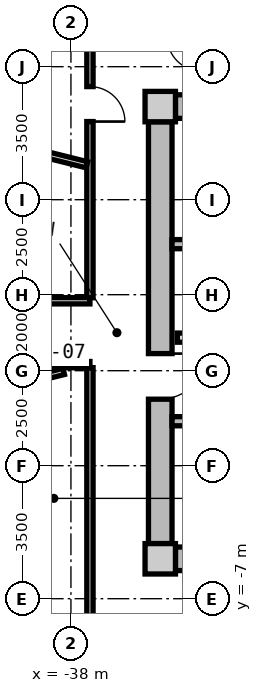
"""IFC4 building model, lengths in metres.
Left out: names, types, materials, properties, quantities, classifications, styles, units other than length and angle.
Written with IfcOpenShell. Run it as: python <this file> out.ifc"""

import sys

from ifc_helpers import new_model, si_unit, direction, frame, frame_2d, origin, origin_2d, place, context, subcontext, project, spatial, rectangle, extrude, source, transform, mapped, element, fill, save


model = new_model("IFC4")
c1 = context("Model", 3, precision=1e-05, world=origin(), true_north=direction((0.0, 1.0)))
c2 = subcontext(c1, "Body", "Model", "MODEL_VIEW")
j1 = project(units=[si_unit("LENGTHUNIT", "METRE"), si_unit("PLANEANGLEUNIT", "RADIAN")], contexts=[c1])
p1 = place(None, origin())
s1 = spatial("IfcSite", under=j1, at=p1, CompositionType="ELEMENT")
p2 = place(p1, origin())
s2 = spatial("IfcBuilding", under=s1, at=p2, CompositionType="ELEMENT")
p3 = place(p2, frame((0.0, 0.0, 161.75)))
s3 = spatial("IfcBuildingStorey", under=s2, at=p3, CompositionType="ELEMENT", Elevation=161.75)
m1 = source(origin(), c2, "Body", "SweptSolid", [
    extrude(rectangle(XDim=0.8, YDim=0.8, at=origin_2d()), origin(), (0.0, 0.0, 1.0), 3.05),
])
for number, where, z_axis, x_axis in (
    (1, (-35.65, -5.95, 0.0), (0.0, 0.0, 1.0), (1.0, 0.0, 0.0)),
    (2, (-35.65, 5.95, 0.0), (0.0, 0.0, 1.0), (1.0, 0.0, 0.0)),
):
    element("IfcColumn", number, at=place(p3, frame(where, z_axis=z_axis, x_axis=x_axis)), inside=s3, PredefinedType="COLUMN", context=c2, shape_type="MappedRepresentation", body=[
        mapped(m1, transform((0.0, 0.0, 0.0), x_axis=(1.0, 0.0, 0.0), y_axis=(0.0, 1.0, 0.0), z_axis=(0.0, 0.0, 1.0), scale=1.0)),
    ])
m2 = source(origin(), c2, "Body", "SweptSolid", [
    extrude(rectangle(XDim=14.5, YDim=0.62, at=frame_2d((7.25, 0.0))), origin(), (0.0, 0.0, 1.0), 2.81),
])
for number, where, z_axis, x_axis in (
    (3, (-35.25, 5.95, 0.0), (0.0, 0.0, 1.0), (1.0, 0.0, 0.0)),
    (4, (-20.75, -5.95, 0.0), (0.0, 0.0, 1.0), (-1.0, 0.0, 0.0)),
):
    element("IfcWall", number, at=place(p3, frame(where, z_axis=z_axis, x_axis=x_axis)), inside=s3, PredefinedType="SHEAR", context=c2, shape_type="MappedRepresentation", body=[
        mapped(m2, transform((0.0, 0.0, 0.0), x_axis=(1.0, 0.0, 0.0), y_axis=(0.0, 1.0, 0.0), z_axis=(0.0, 0.0, 1.0), scale=1.0)),
    ])
m3 = source(origin(), c2, "Body", "SweptSolid", [
    extrude(rectangle(XDim=11.1, YDim=0.62, at=frame_2d((5.55, 0.0))), origin(), (0.0, 0.0, 1.0), 2.81),
])
p4 = place(p3, frame((-35.65, -5.55, 0.0), z_axis=(0.0, 0.0, 1.0), x_axis=(0.0, 1.0, 0.0)))
e5 = element("IfcWall", 5, at=p4, inside=s3, PredefinedType="SHEAR", context=c2, shape_type="MappedRepresentation", body=[
    mapped(m3, transform((0.0, 0.0, 0.0), x_axis=(1.0, 0.0, 0.0), y_axis=(0.0, 1.0, 0.0), z_axis=(0.0, 0.0, 1.0), scale=1.0)),
])
p5 = place(p4, frame((3.8, 0.0, 0.0)))
e6 = element("IfcOpeningElement", 6, at=p5, cuts=e5, PredefinedType="OPENING", context=c2, shape_type="SweptSolid", body=[
    extrude(rectangle(XDim=1.2, YDim=2.15, at=frame_2d((0.6, 1.075))), frame((0.0, 0.32, 0.0), z_axis=(0.0, -1.0, 0.0), x_axis=(1.0, 0.0, 0.0)), (0.0, 0.0, 1.0), 0.64),
])
m4 = source(origin(), c2, "Body", "SweptSolid", [
    extrude(rectangle(XDim=7.88, YDim=0.24, at=frame_2d((3.94, 0.0))), origin(), (0.0, 0.0, 1.0), 2.81),
])
p6 = place(p3, frame((-35.34, 2.33, 0.0), z_axis=(0.0, 0.0, 1.0), x_axis=(1.0, 0.0, 0.0)))
e7 = element("IfcWall", 7, at=p6, inside=s3, PredefinedType="PARTITIONING", context=c2, shape_type="MappedRepresentation", body=[
    mapped(m4, transform((0.0, 0.0, 0.0), x_axis=(1.0, 0.0, 0.0), y_axis=(0.0, 1.0, 0.0), z_axis=(0.0, 0.0, 1.0), scale=1.0)),
])
p7 = place(p3, frame((-35.34, -2.33, 0.0), z_axis=(0.0, 0.0, 1.0), x_axis=(1.0, 0.0, 0.0)))
e8 = element("IfcWall", 8, at=p7, inside=s3, PredefinedType="PARTITIONING", context=c2, shape_type="MappedRepresentation", body=[
    mapped(m4, transform((0.0, 0.0, 0.0), x_axis=(1.0, 0.0, 0.0), y_axis=(0.0, 1.0, 0.0), z_axis=(0.0, 0.0, 1.0), scale=1.0)),
])
p8 = place(p7, frame((1.0, 0.0, 0.0)))
e9 = element("IfcOpeningElement", 9, at=p8, cuts=e8, PredefinedType="OPENING", context=c2, shape_type="SweptSolid", body=[
    extrude(rectangle(XDim=1.1, YDim=2.15, at=frame_2d((0.55, 1.075))), frame((0.0, 0.13, 0.0), z_axis=(0.0, -1.0, 0.0), x_axis=(1.0, 0.0, 0.0)), (0.0, 0.0, 1.0), 0.26),
])
m5 = source(origin(), c2, "Body", "SweptSolid", [
    extrude(rectangle(XDim=7.62, YDim=0.24, at=frame_2d((3.81, 0.0))), origin(), (0.0, 0.0, 1.0), 2.795),
])
p9 = place(p3, frame((-35.2, -0.13, 0.0), z_axis=(0.0, 0.0, 1.0), x_axis=(1.0, 0.0, 0.0)))
e10 = element("IfcWall", 10, at=p9, inside=s3, PredefinedType="PARTITIONING", context=c2, shape_type="MappedRepresentation", body=[
    mapped(m5, transform((0.0, 0.0, 0.0), x_axis=(1.0, 0.0, 0.0), y_axis=(0.0, 1.0, 0.0), z_axis=(0.0, 0.0, 1.0), scale=1.0)),
])
p10 = place(p9, frame((6.22, 0.0, 0.0)))
e11 = element("IfcOpeningElement", 11, at=p10, cuts=e10, PredefinedType="OPENING", context=c2, shape_type="SweptSolid", body=[
    extrude(rectangle(XDim=1.0, YDim=2.1, at=frame_2d((0.5, 1.05))), frame((0.0, 0.13, 0.0), z_axis=(0.0, -1.0, 0.0), x_axis=(1.0, 0.0, 0.0)), (0.0, 0.0, 1.0), 0.26),
])
p11 = place(p9, frame((2.4, 0.0, 0.0)))
e12 = element("IfcOpeningElement", 12, at=p11, cuts=e10, PredefinedType="OPENING", context=c2, shape_type="SweptSolid", body=[
    extrude(rectangle(XDim=1.0, YDim=2.1, at=frame_2d((0.5, 1.05))), frame((0.0, 0.13, 0.0), z_axis=(0.0, -1.0, 0.0), x_axis=(1.0, 0.0, 0.0)), (0.0, 0.0, 1.0), 0.26),
])
m6 = source(origin(), c2, "Body", "SweptSolid", [
    extrude(rectangle(XDim=6.88, YDim=0.165, at=frame_2d((3.44, 0.0))), origin(), (0.0, 0.0, 1.0), 2.795),
])
p12 = place(p3, frame((-37.5, -7.8, 0.0), z_axis=(0.0, 0.0, 1.0), x_axis=(0.0, 1.0, 0.0)))
e13 = element("IfcWall", 13, at=p12, inside=s3, PredefinedType="PARTITIONING", context=c2, shape_type="MappedRepresentation", body=[
    mapped(m6, transform((0.0, 0.0, 0.0), x_axis=(1.0, 0.0, 0.0), y_axis=(0.0, 1.0, 0.0), z_axis=(0.0, 0.0, 1.0), scale=1.0)),
])
p13 = place(p3, frame((-37.5, 0.92, 0.0), z_axis=(0.0, 0.0, 1.0), x_axis=(0.0, 1.0, 0.0)))
e14 = element("IfcWall", 14, at=p13, inside=s3, PredefinedType="PARTITIONING", context=c2, shape_type="MappedRepresentation", body=[
    mapped(m6, transform((0.0, 0.0, 0.0), x_axis=(1.0, 0.0, 0.0), y_axis=(0.0, 1.0, 0.0), z_axis=(0.0, 0.0, 1.0), scale=1.0)),
])
p14 = place(p13, frame((4.636, 0.0, 0.0)))
e15 = element("IfcOpeningElement", 15, at=p14, cuts=e14, PredefinedType="OPENING", context=c2, shape_type="SweptSolid", body=[
    extrude(rectangle(XDim=0.92, YDim=2.1, at=frame_2d((0.46, 1.05))), frame((0.0, 0.093, 0.0), z_axis=(0.0, -1.0, 0.0), x_axis=(1.0, 0.0, 0.0)), (0.0, 0.0, 1.0), 0.185),
])
m7 = source(origin(), c2, "Body", "SweptSolid", [
    extrude(rectangle(XDim=6.193, YDim=0.165, at=frame_2d((3.096, 0.0))), origin(), (0.0, 0.0, 1.0), 2.345),
])
p15 = place(p3, frame((-37.58, 4.419, 0.0), z_axis=(0.0, 0.0, 1.0), x_axis=(-0.970309243466, 0.241867674657, 0.0)))
e16 = element("IfcWall", 16, at=p15, inside=s3, PredefinedType="PARTITIONING", context=c2, shape_type="MappedRepresentation", body=[
    mapped(m7, transform((0.0, 0.0, 0.0), x_axis=(1.0, 0.0, 0.0), y_axis=(0.0, 1.0, 0.0), z_axis=(0.0, 0.0, 1.0), scale=1.0)),
])
m8 = source(origin(), c2, "Body", "SweptSolid", [
    extrude(rectangle(XDim=5.564, YDim=0.165, at=frame_2d((2.782, 0.0))), origin(), (0.0, 0.0, 1.0), 2.345),
])
p16 = place(p3, frame((-38.19, -1.02, 0.0), z_axis=(0.0, 0.0, 1.0), x_axis=(-0.97031260977, -0.241854169533, 0.0)))
e17 = element("IfcWall", 17, at=p16, inside=s3, PredefinedType="PARTITIONING", context=c2, shape_type="MappedRepresentation", body=[
    mapped(m8, transform((0.0, 0.0, 0.0), x_axis=(1.0, 0.0, 0.0), y_axis=(0.0, 1.0, 0.0), z_axis=(0.0, 0.0, 1.0), scale=1.0)),
])
m9 = source(origin(), c2, "Body", "SweptSolid", [
    extrude(rectangle(XDim=6.139, YDim=0.165, at=frame_2d((3.069, 0.0))), origin(), (0.0, 0.0, 1.0), 2.795),
])
p17 = place(p3, frame((-43.639, 0.84, 0.0), z_axis=(0.0, 0.0, 1.0), x_axis=(1.0, 0.0, 0.0)))
e18 = element("IfcWall", 18, at=p17, inside=s3, PredefinedType="PARTITIONING", context=c2, shape_type="MappedRepresentation", body=[
    mapped(m9, transform((0.0, 0.0, 0.0), x_axis=(1.0, 0.0, 0.0), y_axis=(0.0, 1.0, 0.0), z_axis=(0.0, 0.0, 1.0), scale=1.0)),
])
p18 = place(p17, frame((2.594, 0.0, 0.0)))
e19 = element("IfcOpeningElement", 19, at=p18, cuts=e18, PredefinedType="OPENING", context=c2, shape_type="SweptSolid", body=[
    extrude(rectangle(XDim=0.95, YDim=2.1, at=frame_2d((0.475, 1.05))), frame((0.0, 0.093, 0.0), z_axis=(0.0, -1.0, 0.0), x_axis=(1.0, 0.0, 0.0)), (0.0, 0.0, 1.0), 0.185),
])
p19 = place(p3, frame((-37.5, -0.84, 0.0), z_axis=(0.0, 0.0, 1.0), x_axis=(-1.0, 0.0, 0.0)))
e20 = element("IfcWall", 20, at=p19, inside=s3, PredefinedType="PARTITIONING", context=c2, shape_type="MappedRepresentation", body=[
    mapped(m9, transform((0.0, 0.0, 0.0), x_axis=(1.0, 0.0, 0.0), y_axis=(0.0, 1.0, 0.0), z_axis=(0.0, 0.0, 1.0), scale=1.0)),
])
m10 = source(origin(), c2, "Body", "SweptSolid", [
    extrude(rectangle(XDim=1.2, YDim=2.15, at=frame_2d((0.6, 1.075))), frame((0.0, 0.025, 0.0), z_axis=(0.0, -1.0, 0.0), x_axis=(1.0, 0.0, 0.0)), (0.0, 0.0, 1.0), 0.05),
])
p20 = place(p5, frame((1.2, 0.0, 0.0), z_axis=(0.0, 0.0, 1.0), x_axis=(-1.0, 0.0, 0.0)))
e21 = element("IfcDoor", 21, at=p20, inside=s3, OperationType="SINGLE_SWING_LEFT", PredefinedType="DOOR", context=c2, shape_type="MappedRepresentation", body=[
    mapped(m10, transform((0.0, 0.0, 0.0), x_axis=(1.0, 0.0, 0.0), y_axis=(0.0, 1.0, 0.0), z_axis=(0.0, 0.0, 1.0), scale=1.0)),
])
fill(e6, e21)
m11 = source(origin(), c2, "Body", "SweptSolid", [
    extrude(rectangle(XDim=0.92, YDim=2.1, at=frame_2d((0.46, 1.05))), frame((0.0, 0.025, 0.0), z_axis=(0.0, -1.0, 0.0), x_axis=(1.0, 0.0, 0.0)), (0.0, 0.0, 1.0), 0.05),
])
p21 = place(p14, frame((0.92, 0.0, 0.0), z_axis=(0.0, 0.0, 1.0), x_axis=(-1.0, 0.0, 0.0)))
e22 = element("IfcDoor", 22, at=p21, inside=s3, OperationType="SINGLE_SWING_RIGHT", PredefinedType="DOOR", context=c2, shape_type="MappedRepresentation", body=[
    mapped(m11, transform((0.0, 0.0, 0.0), x_axis=(1.0, 0.0, 0.0), y_axis=(0.0, 1.0, 0.0), z_axis=(0.0, 0.0, 1.0), scale=1.0)),
])
fill(e15, e22)
save(model, sys.argv[1])
